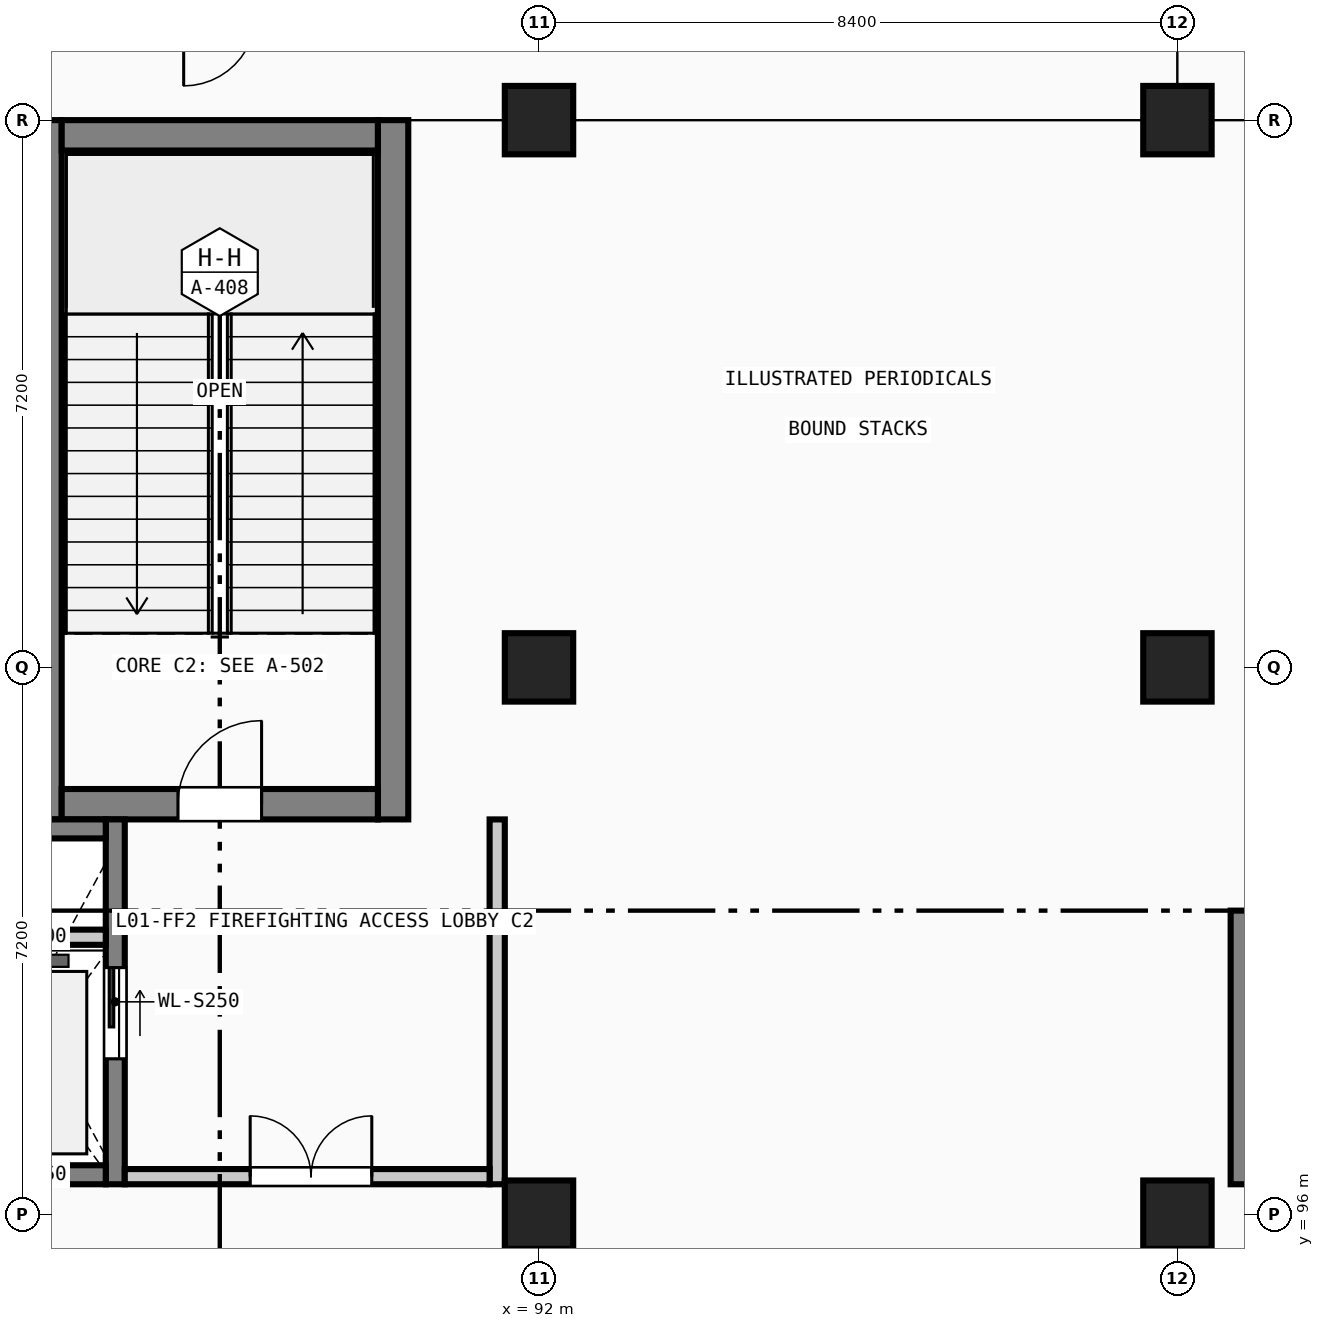
"""IFC4 building model, lengths in metres.
Left out: names, types, materials, properties, quantities, classifications, styles, units other than length and angle.
Written with IfcOpenShell. Run it as: python <this file> out.ifc"""

import sys

from ifc_helpers import new_model, si_unit, direction, frame, frame_2d, origin, origin_2d, place, context, subcontext, project, spatial, rectangle, extrude, element, fill, save


model = new_model("IFC4")
c1 = context("Model", 3, precision=1e-05, world=origin(), true_north=direction((0.0, 1.0)))
c2 = subcontext(c1, "Body", "Model", "MODEL_VIEW")
j1 = project(units=[si_unit("LENGTHUNIT", "METRE"), si_unit("PLANEANGLEUNIT", "RADIAN")], contexts=[c1])
p1 = place(None, origin())
s1 = spatial("IfcSite", under=j1, at=p1, CompositionType="ELEMENT")
p2 = place(p1, origin())
s2 = spatial("IfcBuilding", under=s1, at=p2, CompositionType="ELEMENT")
p3 = place(p2, frame((0.0, 0.0, 4.8)))
s3 = spatial("IfcBuildingStorey", under=s2, at=p3, CompositionType="ELEMENT", Elevation=4.8)
for number, where, z_axis, x_axis in (
    (1, (92.0, 96.0, 0.0), (0.0, 0.0, 1.0), (1.0, 0.0, 0.0)),
    (2, (92.0, 103.2, 0.0), (0.0, 0.0, 1.0), (1.0, 0.0, 0.0)),
    (3, (92.0, 110.4, 0.0), (0.0, 0.0, 1.0), (1.0, 0.0, 0.0)),
    (4, (100.4, 96.0, 0.0), (0.0, 0.0, 1.0), (1.0, 0.0, 0.0)),
    (5, (100.4, 103.2, 0.0), (0.0, 0.0, 1.0), (1.0, 0.0, 0.0)),
    (6, (100.4, 110.4, 0.0), (0.0, 0.0, 1.0), (1.0, 0.0, 0.0)),
):
    element("IfcColumn", number, at=place(p3, frame(where, z_axis=z_axis, x_axis=x_axis)), inside=s3, PredefinedType="COLUMN", context=c2, shape_type="SweptSolid", body=[
        extrude(rectangle(XDim=0.9, YDim=0.9, at=origin_2d()), origin(), (0.0, 0.0, 1.0), 4.8),
    ])
for number, where, z_axis, x_axis in (
    (7, (85.52, 101.2, 0.0), (0.0, 0.0, 1.0), (0.0, 1.0, 0.0)),
    (8, (90.08, 110.4, 0.0), (0.0, 0.0, 1.0), (0.0, -1.0, 0.0)),
):
    element("IfcWall", number, at=place(p3, frame(where, z_axis=z_axis, x_axis=x_axis)), inside=s3, PredefinedType="SHEAR", context=c2, shape_type="SweptSolid", body=[
        extrude(rectangle(XDim=9.2, YDim=0.4, at=frame_2d((4.6, 0.0))), origin(), (0.0, 0.0, 1.0), 4.525),
    ])
p4 = place(p3, frame((89.88, 101.4, 0.0), z_axis=(0.0, 0.0, 1.0), x_axis=(-1.0, 0.0, 0.0)))
e9 = element("IfcWall", 9, at=p4, inside=s3, PredefinedType="SHEAR", context=c2, shape_type="SweptSolid", body=[
    extrude(rectangle(XDim=4.16, YDim=0.4, at=frame_2d((2.08, 0.0))), origin(), (0.0, 0.0, 1.0), 4.525),
])
p5 = place(p4, frame((1.53, 0.0, 0.0)))
e10 = element("IfcOpeningElement", 10, at=p5, cuts=e9, PredefinedType="OPENING", context=c2, shape_type="SweptSolid", body=[
    extrude(rectangle(XDim=1.1, YDim=2.2, at=frame_2d((0.55, 1.1))), frame((0.0, 0.21, 0.0), z_axis=(0.0, -1.0, 0.0), x_axis=(1.0, 0.0, 0.0)), (0.0, 0.0, 1.0), 0.42),
])
p6 = place(p3, frame((85.72, 110.2, 0.0), z_axis=(0.0, 0.0, 1.0), x_axis=(1.0, 0.0, 0.0)))
e11 = element("IfcWall", 11, at=p6, inside=s3, PredefinedType="SHEAR", context=c2, shape_type="SweptSolid", body=[
    extrude(rectangle(XDim=4.16, YDim=0.4, at=frame_2d((2.08, 0.0))), origin(), (0.0, 0.0, 1.0), 4.525),
])
p7 = place(p3, frame((86.425, 101.2, 0.0), z_axis=(0.0, 0.0, 1.0), x_axis=(0.0, -1.0, 0.0)))
e12 = element("IfcWall", 12, at=p7, inside=s3, PredefinedType="SOLIDWALL", context=c2, shape_type="SweptSolid", body=[
    extrude(rectangle(XDim=4.8, YDim=0.25, at=frame_2d((2.4, 0.0))), origin(), (0.0, 0.0, 1.0), 4.525),
])
p8 = place(p7, frame((1.95, 0.0, 0.0)))
e13 = element("IfcOpeningElement", 13, at=p8, cuts=e12, PredefinedType="OPENING", context=c2, shape_type="SweptSolid", body=[
    extrude(rectangle(XDim=1.2, YDim=2.2, at=frame_2d((0.6, 1.1))), frame((0.0, 0.135, 0.0), z_axis=(0.0, -1.0, 0.0), x_axis=(1.0, 0.0, 0.0)), (0.0, 0.0, 1.0), 0.27),
])
for number, where, z_axis, x_axis in (
    (14, (86.3, 96.525, 0.0), (0.0, 0.0, 1.0), (-1.0, 0.0, 0.0)),
    (15, (84.2, 101.075, 0.0), (0.0, 0.0, 1.0), (1.0, 0.0, 0.0)),
):
    element("IfcWall", number, at=place(p3, frame(where, z_axis=z_axis, x_axis=x_axis)), inside=s3, PredefinedType="SOLIDWALL", context=c2, shape_type="SweptSolid", body=[
        extrude(rectangle(XDim=2.1, YDim=0.25, at=frame_2d((1.05, 0.0))), origin(), (0.0, 0.0, 1.0), 4.525),
    ])
p9 = place(p3, frame((84.2, 99.65, 0.0), z_axis=(0.0, 0.0, 1.0), x_axis=(1.0, 0.0, 0.0)))
e16 = element("IfcWall", 16, at=p9, inside=s3, PredefinedType="SOLIDWALL", context=c2, shape_type="SweptSolid", body=[
    extrude(rectangle(XDim=2.1, YDim=0.2, at=frame_2d((1.05, 0.0))), origin(), (0.0, 0.0, 1.0), 4.525),
])
p10 = place(p3, frame((91.45, 101.2, 0.0), z_axis=(0.0, 0.0, 1.0), x_axis=(0.0, -1.0, 0.0)))
e17 = element("IfcWall", 17, at=p10, inside=s3, PredefinedType="SOLIDWALL", context=c2, shape_type="SweptSolid", body=[
    extrude(rectangle(XDim=4.8, YDim=0.2, at=frame_2d((2.4, 0.0))), origin(), (0.0, 0.0, 1.0), 4.525),
])
p11 = place(p3, frame((91.35, 96.5, 0.0), z_axis=(0.0, 0.0, 1.0), x_axis=(-1.0, 0.0, 0.0)))
e18 = element("IfcWall", 18, at=p11, inside=s3, PredefinedType="SOLIDWALL", context=c2, shape_type="SweptSolid", body=[
    extrude(rectangle(XDim=4.8, YDim=0.2, at=frame_2d((2.4, 0.0))), origin(), (0.0, 0.0, 1.0), 4.525),
])
p12 = place(p11, frame((1.55, 0.0, 0.0)))
e19 = element("IfcOpeningElement", 19, at=p12, cuts=e18, PredefinedType="OPENING", context=c2, shape_type="SweptSolid", body=[
    extrude(rectangle(XDim=1.6, YDim=2.2, at=frame_2d((0.8, 1.1))), frame((0.0, 0.11, 0.0), z_axis=(0.0, -1.0, 0.0), x_axis=(1.0, 0.0, 0.0)), (0.0, 0.0, 1.0), 0.22),
])
p13 = place(p3, frame((101.225, 96.4, 0.0), z_axis=(0.0, 0.0, 1.0), x_axis=(0.0, 1.0, 0.0)))
e20 = element("IfcWall", 20, at=p13, inside=s3, PredefinedType="SOLIDWALL", context=c2, shape_type="SweptSolid", body=[
    extrude(rectangle(XDim=3.6, YDim=0.25, at=frame_2d((1.8, 0.0))), origin(), (0.0, 0.0, 1.0), 4.5),
])
p14 = place(p5, frame((1.1, 0.0, 0.0), z_axis=(0.0, 0.0, 1.0), x_axis=(-1.0, 0.0, 0.0)))
e21 = element("IfcDoor", 21, at=p14, inside=s3, OperationType="SINGLE_SWING_RIGHT", PredefinedType="DOOR", context=c2, shape_type="SweptSolid", body=[
    extrude(rectangle(XDim=1.1, YDim=2.2, at=frame_2d((0.55, 1.1))), frame((0.0, 0.025, 0.0), z_axis=(0.0, -1.0, 0.0), x_axis=(1.0, 0.0, 0.0)), (0.0, 0.0, 1.0), 0.05),
])
fill(e10, e21)
p15 = place(p8, origin())
e22 = element("IfcDoor", 22, at=p15, inside=s3, OperationType="SLIDING_TO_LEFT", PredefinedType="DOOR", context=c2, shape_type="SweptSolid", body=[
    extrude(rectangle(XDim=1.2, YDim=2.2, at=frame_2d((0.6, 1.1))), frame((0.0, 0.025, 0.0), z_axis=(0.0, -1.0, 0.0), x_axis=(1.0, 0.0, 0.0)), (0.0, 0.0, 1.0), 0.05),
])
fill(e13, e22)
p16 = place(p12, frame((1.6, 0.0, 0.0), z_axis=(0.0, 0.0, 1.0), x_axis=(-1.0, 0.0, 0.0)))
e23 = element("IfcDoor", 23, at=p16, inside=s3, OperationType="DOUBLE_DOOR_SINGLE_SWING", PredefinedType="DOOR", context=c2, shape_type="SweptSolid", body=[
    extrude(rectangle(XDim=1.6, YDim=2.2, at=frame_2d((0.8, 1.1))), frame((0.0, 0.025, 0.0), z_axis=(0.0, -1.0, 0.0), x_axis=(1.0, 0.0, 0.0)), (0.0, 0.0, 1.0), 0.05),
])
fill(e19, e23)
save(model, sys.argv[1])
